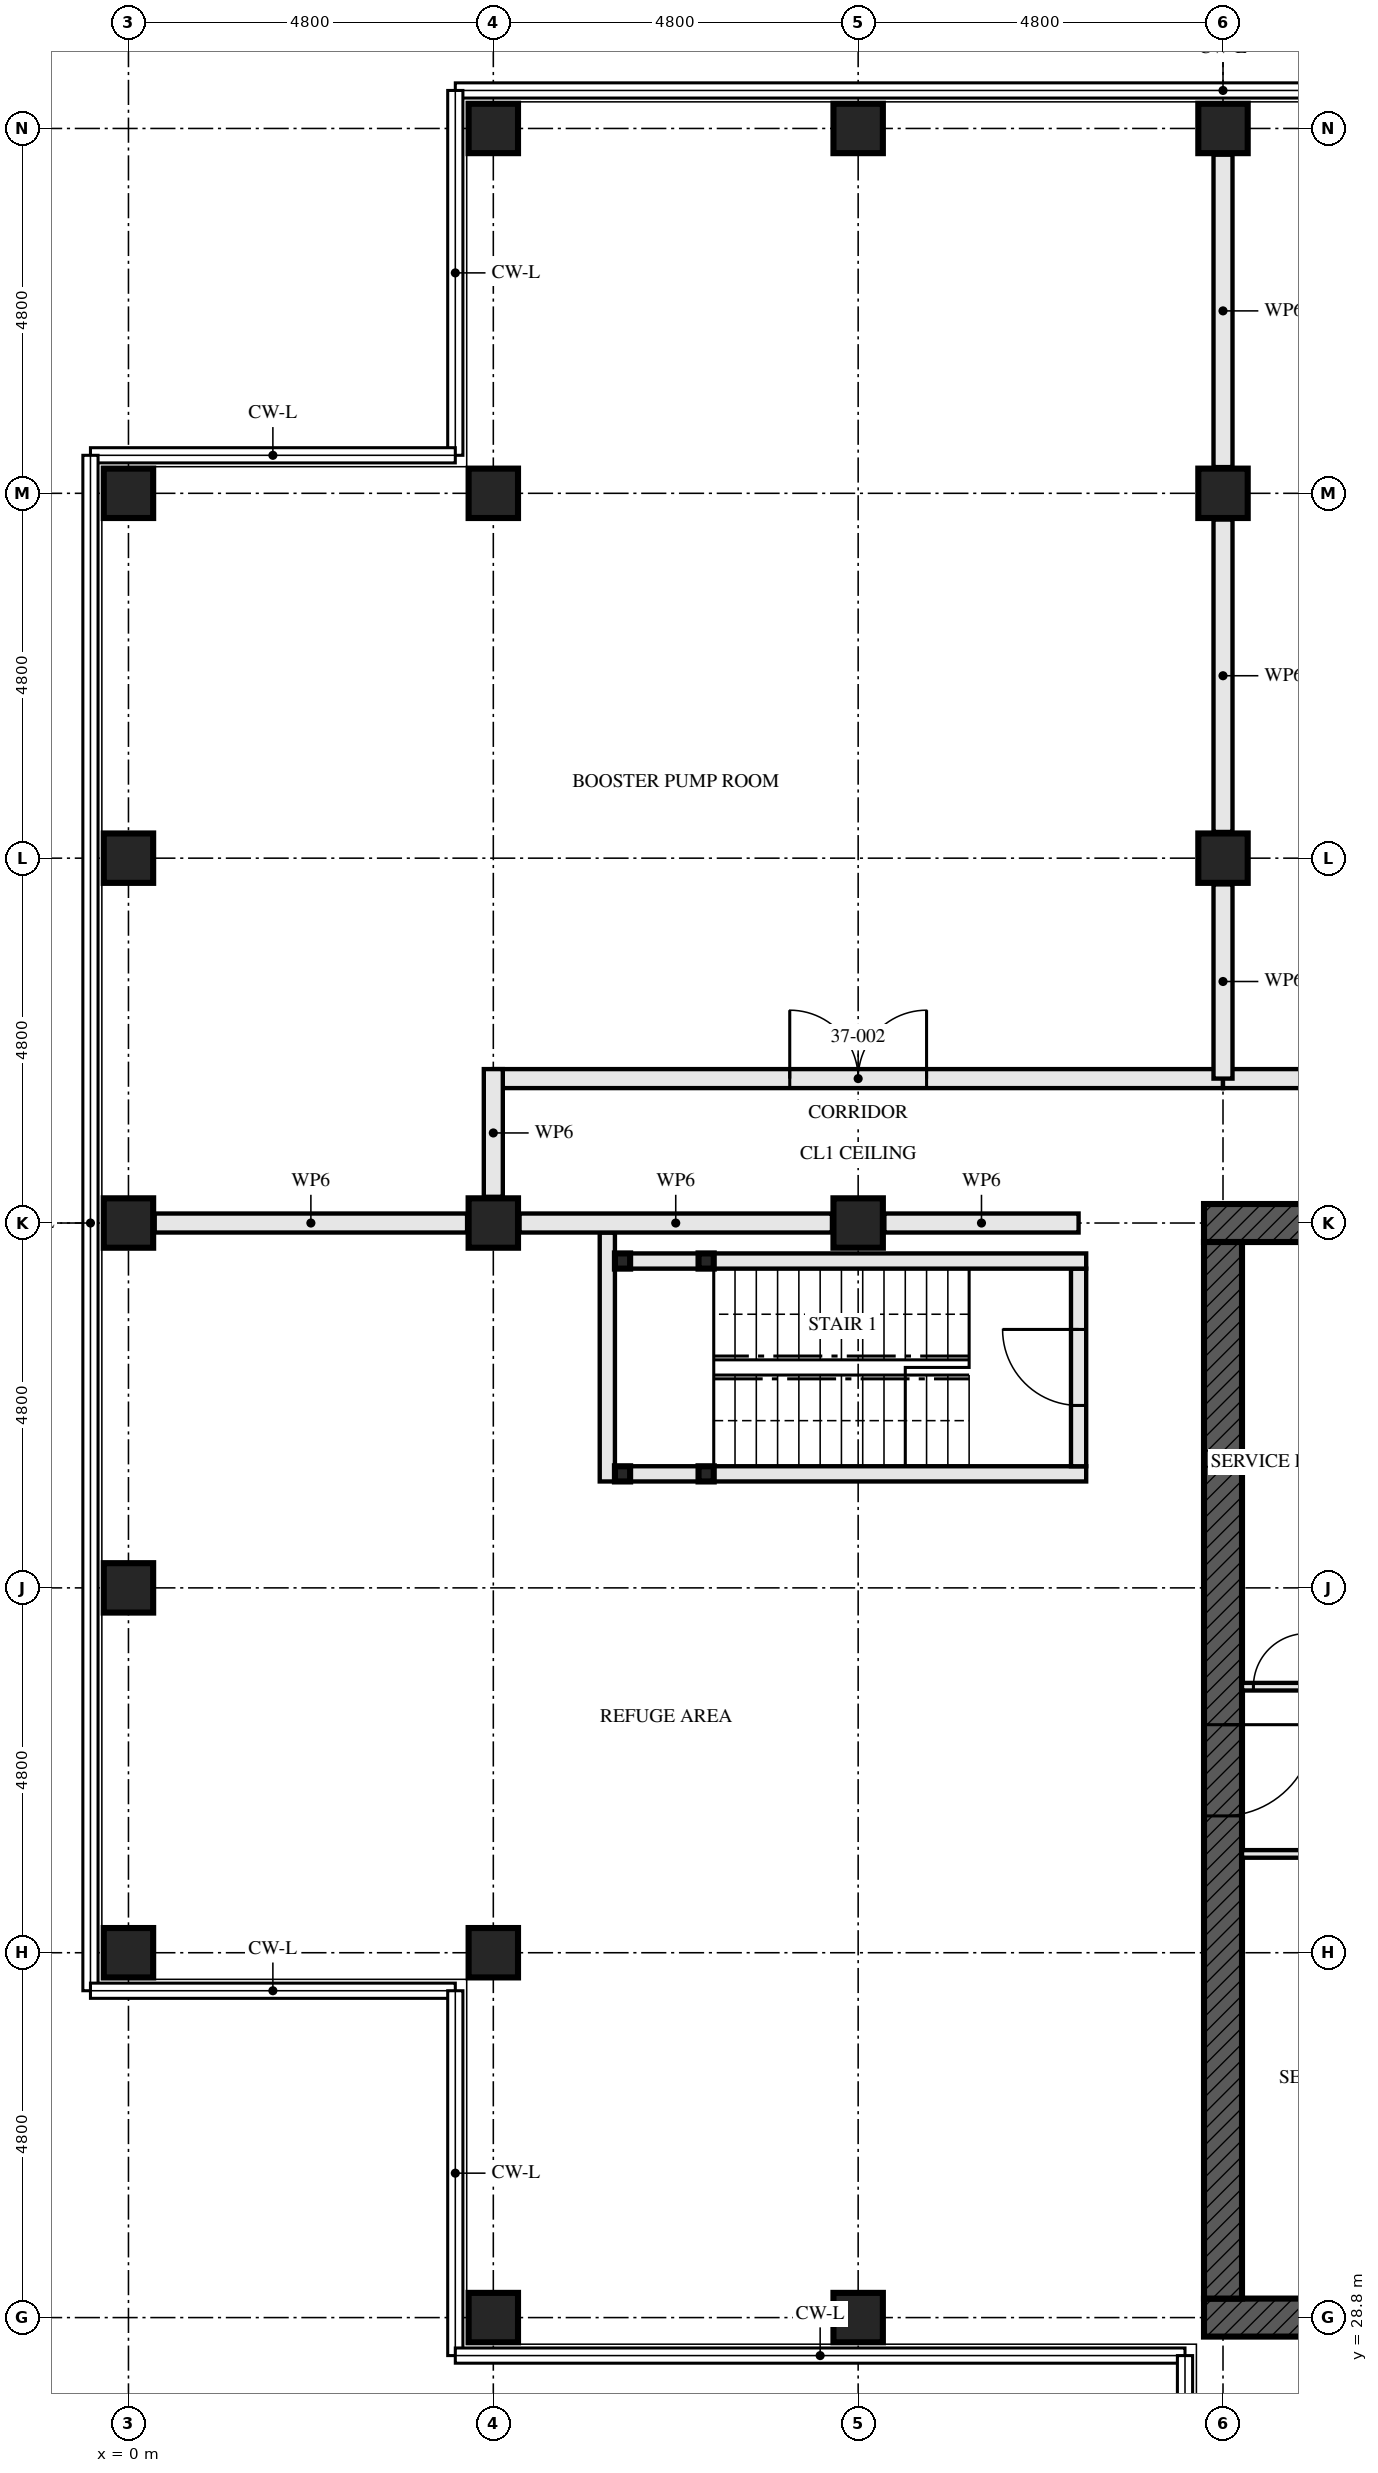
"""IFC4 building model, lengths in metres.
Left out: names, types, materials, properties, quantities, classifications, styles, units other than length and angle.
Written with IfcOpenShell. Run it as: python <this file> out.ifc"""

import sys

from ifc_helpers import new_model, si_unit, direction, frame, frame_2d, origin, origin_2d, place, context, subcontext, project, spatial, rectangle, hollow_rectangle, extrude, element, fill, save


model = new_model("IFC4")
c1 = context("Model", 3, precision=1e-05, world=origin(), true_north=direction((0.0, 1.0)))
c2 = subcontext(c1, "Body", "Model", "MODEL_VIEW")
j1 = project(units=[si_unit("LENGTHUNIT", "METRE"), si_unit("PLANEANGLEUNIT", "RADIAN")], contexts=[c1])
p1 = place(None, origin())
s1 = spatial("IfcSite", under=j1, at=p1, CompositionType="ELEMENT")
p2 = place(p1, origin())
s2 = spatial("IfcBuilding", under=s1, at=p2, CompositionType="ELEMENT")
p3 = place(p2, frame((0.0, 0.0, 136.5)))
s3 = spatial("IfcBuildingStorey", under=s2, at=p3, CompositionType="ELEMENT", Elevation=136.5)
for number, where, z_axis, x_axis in (
    (1, (0.0, 33.6, 0.0), (0.0, 0.0, 1.0), (0.0, 1.0, 0.0)),
    (2, (0.0, 38.4, 0.0), (0.0, 0.0, 1.0), (1.0, 0.0, 0.0)),
):
    element("IfcColumn", number, at=place(p3, frame(where, z_axis=z_axis, x_axis=x_axis)), inside=s3, PredefinedType="COLUMN", context=c2, shape_type="SweptSolid", body=[
        extrude(hollow_rectangle(XDim=0.65, YDim=0.65, WallThickness=0.08, at=origin_2d()), origin(), (0.0, 0.0, 1.0), 4.5),
    ])
for number, where, z_axis, x_axis in (
    (3, (0.0, 43.2, 0.0), (0.0, 0.0, 1.0), (0.0, 1.0, 0.0)),
    (4, (0.0, 48.0, 0.0), (0.0, 0.0, 1.0), (1.0, 0.0, 0.0)),
    (5, (0.0, 52.8, 0.0), (0.0, 0.0, 1.0), (0.0, 1.0, 0.0)),
):
    element("IfcColumn", number, at=place(p3, frame(where, z_axis=z_axis, x_axis=x_axis)), inside=s3, PredefinedType="COLUMN", context=c2, shape_type="SweptSolid", body=[
        extrude(hollow_rectangle(XDim=0.65, YDim=0.65, WallThickness=0.08, at=origin_2d()), origin(), (0.0, 0.0, 1.0), 4.33),
    ])
for number, where, z_axis, x_axis in (
    (6, (4.8, 28.8, 0.0), (0.0, 0.0, 1.0), (0.0, 1.0, 0.0)),
    (7, (4.8, 33.6, 0.0), (0.0, 0.0, 1.0), (0.0, 1.0, 0.0)),
):
    element("IfcColumn", number, at=place(p3, frame(where, z_axis=z_axis, x_axis=x_axis)), inside=s3, PredefinedType="COLUMN", context=c2, shape_type="SweptSolid", body=[
        extrude(hollow_rectangle(XDim=0.65, YDim=0.65, WallThickness=0.08, at=origin_2d()), origin(), (0.0, 0.0, 1.0), 4.5),
    ])
p4 = place(p3, frame((4.8, 43.2, 0.0), z_axis=(0.0, 0.0, 1.0), x_axis=(0.0, 1.0, 0.0)))
e8 = element("IfcColumn", 8, at=p4, inside=s3, PredefinedType="COLUMN", context=c2, shape_type="SweptSolid", body=[
    extrude(hollow_rectangle(XDim=0.65, YDim=0.65, WallThickness=0.05, at=origin_2d()), origin(), (0.0, 0.0, 1.0), 4.5),
])
for number, where, z_axis, x_axis in (
    (9, (4.8, 52.8, 0.0), (0.0, 0.0, 1.0), (0.0, 1.0, 0.0)),
    (10, (4.8, 57.6, 0.0), (0.0, 0.0, 1.0), (0.0, 1.0, 0.0)),
):
    element("IfcColumn", number, at=place(p3, frame(where, z_axis=z_axis, x_axis=x_axis)), inside=s3, PredefinedType="COLUMN", context=c2, shape_type="SweptSolid", body=[
        extrude(hollow_rectangle(XDim=0.65, YDim=0.65, WallThickness=0.08, at=origin_2d()), origin(), (0.0, 0.0, 1.0), 4.33),
    ])
p5 = place(p3, frame((9.6, 28.8, 0.0), z_axis=(0.0, 0.0, 1.0), x_axis=(0.0, 1.0, 0.0)))
e11 = element("IfcColumn", 11, at=p5, inside=s3, PredefinedType="COLUMN", context=c2, shape_type="SweptSolid", body=[
    extrude(hollow_rectangle(XDim=0.65, YDim=0.65, WallThickness=0.08, at=origin_2d()), origin(), (0.0, 0.0, 1.0), 4.5),
])
p6 = place(p3, frame((9.6, 43.2, 0.0), z_axis=(0.0, 0.0, 1.0), x_axis=(0.0, 1.0, 0.0)))
e12 = element("IfcColumn", 12, at=p6, inside=s3, PredefinedType="COLUMN", context=c2, shape_type="SweptSolid", body=[
    extrude(hollow_rectangle(XDim=0.65, YDim=0.65, WallThickness=0.05, at=origin_2d()), origin(), (0.0, 0.0, 1.0), 4.5),
])
p7 = place(p3, frame((9.6, 57.6, 0.0), z_axis=(0.0, 0.0, 1.0), x_axis=(0.0, 1.0, 0.0)))
e13 = element("IfcColumn", 13, at=p7, inside=s3, PredefinedType="COLUMN", context=c2, shape_type="SweptSolid", body=[
    extrude(hollow_rectangle(XDim=0.65, YDim=0.65, WallThickness=0.08, at=origin_2d()), origin(), (0.0, 0.0, 1.0), 4.33),
])
for number, where, z_axis, x_axis in (
    (14, (14.4, 48.0, 0.0), (0.0, 0.0, 1.0), (1.0, 0.0, 0.0)),
    (15, (14.4, 52.8, 0.0), (0.0, 0.0, 1.0), (1.0, 0.0, 0.0)),
):
    element("IfcColumn", number, at=place(p3, frame(where, z_axis=z_axis, x_axis=x_axis)), inside=s3, PredefinedType="COLUMN", context=c2, shape_type="SweptSolid", body=[
        extrude(hollow_rectangle(XDim=0.65, YDim=0.65, WallThickness=0.05, at=origin_2d()), origin(), (0.0, 0.0, 1.0), 4.5),
    ])
p8 = place(p3, frame((14.4, 57.6, 0.0), z_axis=(0.0, 0.0, 1.0), x_axis=(0.0, 1.0, 0.0)))
e16 = element("IfcColumn", 16, at=p8, inside=s3, PredefinedType="COLUMN", context=c2, shape_type="SweptSolid", body=[
    extrude(hollow_rectangle(XDim=0.65, YDim=0.65, WallThickness=0.08, at=origin_2d()), origin(), (0.0, 0.0, 1.0), 4.33),
])
p9 = place(p3, frame((14.15, 28.8, -0.25), z_axis=(0.0, 0.0, 1.0), x_axis=(1.0, 0.0, 0.0)))
e17 = element("IfcWall", 17, at=p9, inside=s3, PredefinedType="SHEAR", context=c2, shape_type="SweptSolid", body=[
    extrude(rectangle(XDim=14.9, YDim=0.5, at=frame_2d((7.45, 0.0))), origin(), (0.0, 0.0, 1.0), 4.58),
])
p10 = place(p9, frame((6.85, 0.0, 0.25)))
e18 = element("IfcOpeningElement", 18, at=p10, cuts=e17, PredefinedType="OPENING", context=c2, shape_type="SweptSolid", body=[
    extrude(rectangle(XDim=1.2, YDim=2.1, at=frame_2d((0.6, 1.05))), frame((0.0, 0.26, 0.0), z_axis=(0.0, -1.0, 0.0), x_axis=(1.0, 0.0, 0.0)), (0.0, 0.0, 1.0), 0.521),
])
p11 = place(p3, frame((29.05, 43.2, -0.25), z_axis=(0.0, 0.0, 1.0), x_axis=(-1.0, 0.0, 0.0)))
e19 = element("IfcWall", 19, at=p11, inside=s3, PredefinedType="SHEAR", context=c2, shape_type="SweptSolid", body=[
    extrude(rectangle(XDim=14.9, YDim=0.5, at=frame_2d((7.45, 0.0))), origin(), (0.0, 0.0, 1.0), 4.58),
])
p12 = place(p11, frame((6.85, 0.0, 0.25)))
e20 = element("IfcOpeningElement", 20, at=p12, cuts=e19, PredefinedType="OPENING", context=c2, shape_type="SweptSolid", body=[
    extrude(rectangle(XDim=1.2, YDim=2.1, at=frame_2d((0.6, 1.05))), frame((0.0, 0.26, 0.0), z_axis=(0.0, -1.0, 0.0), x_axis=(1.0, 0.0, 0.0)), (0.0, 0.0, 1.0), 0.521),
])
p13 = place(p3, frame((14.4, 42.95, -0.25), z_axis=(0.0, 0.0, 1.0), x_axis=(0.0, -1.0, 0.0)))
e21 = element("IfcWall", 21, at=p13, inside=s3, PredefinedType="SHEAR", context=c2, shape_type="SweptSolid", body=[
    extrude(rectangle(XDim=13.9, YDim=0.5, at=frame_2d((6.95, 0.0))), origin(), (0.0, 0.0, 1.0), 4.58),
])
p14 = place(p13, frame((6.35, 0.0, 0.25)))
e22 = element("IfcOpeningElement", 22, at=p14, cuts=e21, PredefinedType="OPENING", context=c2, shape_type="SweptSolid", body=[
    extrude(rectangle(XDim=1.2, YDim=2.1, at=frame_2d((0.6, 1.05))), frame((0.0, 0.26, 0.0), z_axis=(0.0, -1.0, 0.0), x_axis=(1.0, 0.0, 0.0)), (0.0, 0.0, 1.0), 0.521),
])
for number, where, z_axis, x_axis in (
    (23, (6.5, 42.7, 0.0), (0.0, 0.0, 1.0), (1.0, 0.0, 0.0)),
    (24, (6.5, 39.9, 0.0), (0.0, 0.0, 1.0), (1.0, 0.0, 0.0)),
    (25, (7.6, 42.7, 0.0), (0.0, 0.0, 1.0), (1.0, 0.0, 0.0)),
    (26, (7.6, 39.9, 0.0), (0.0, 0.0, 1.0), (1.0, 0.0, 0.0)),
):
    element("IfcColumn", number, at=place(p3, frame(where, z_axis=z_axis, x_axis=x_axis)), inside=s3, PredefinedType="COLUMN", context=c2, shape_type="SweptSolid", body=[
        extrude(hollow_rectangle(XDim=0.2, YDim=0.2, WallThickness=0.008, at=origin_2d()), origin(), (0.0, 0.0, 1.0), 4.33),
    ])
p15 = place(p3, frame((6.6, 42.7, 0.0), z_axis=(0.0, 0.0, 1.0), x_axis=(1.0, 0.0, 0.0)))
e27 = element("IfcWall", 27, at=p15, inside=s3, PredefinedType="SOLIDWALL", context=c2, shape_type="SweptSolid", body=[
    extrude(rectangle(XDim=0.9, YDim=0.2, at=frame_2d((0.45, 0.0))), origin(), (0.0, 0.0, 1.0), 3.99),
])
p16 = place(p3, frame((7.7, 42.7, 0.0), z_axis=(0.0, 0.0, 1.0), x_axis=(1.0, 0.0, 0.0)))
e28 = element("IfcWall", 28, at=p16, inside=s3, PredefinedType="SOLIDWALL", context=c2, shape_type="SweptSolid", body=[
    extrude(rectangle(XDim=4.9, YDim=0.2, at=frame_2d((2.45, 0.0))), origin(), (0.0, 0.0, 1.0), 3.99),
])
p17 = place(p3, frame((6.6, 39.9, 0.0), z_axis=(0.0, 0.0, 1.0), x_axis=(1.0, 0.0, 0.0)))
e29 = element("IfcWall", 29, at=p17, inside=s3, PredefinedType="SOLIDWALL", context=c2, shape_type="SweptSolid", body=[
    extrude(rectangle(XDim=0.9, YDim=0.2, at=frame_2d((0.45, 0.0))), origin(), (0.0, 0.0, 1.0), 3.99),
])
p18 = place(p3, frame((7.7, 39.9, 0.0), z_axis=(0.0, 0.0, 1.0), x_axis=(1.0, 0.0, 0.0)))
e30 = element("IfcWall", 30, at=p18, inside=s3, PredefinedType="SOLIDWALL", context=c2, shape_type="SweptSolid", body=[
    extrude(rectangle(XDim=4.9, YDim=0.2, at=frame_2d((2.45, 0.0))), origin(), (0.0, 0.0, 1.0), 3.99),
])
p19 = place(p3, frame((6.3, 43.075, 0.0), z_axis=(0.0, 0.0, 1.0), x_axis=(0.0, -1.0, 0.0)))
e31 = element("IfcWall", 31, at=p19, inside=s3, PredefinedType="SOLIDWALL", context=c2, shape_type="SweptSolid", body=[
    extrude(rectangle(XDim=3.275, YDim=0.2, at=frame_2d((1.637, 0.0))), origin(), (0.0, 0.0, 1.0), 4.33),
])
p20 = place(p3, frame((12.5, 42.6, 0.0), z_axis=(0.0, 0.0, 1.0), x_axis=(0.0, -1.0, 0.0)))
e32 = element("IfcWall", 32, at=p20, inside=s3, PredefinedType="SOLIDWALL", context=c2, shape_type="SweptSolid", body=[
    extrude(rectangle(XDim=2.6, YDim=0.2, at=frame_2d((1.3, 0.0))), origin(), (0.0, 0.0, 1.0), 4.33),
])
p21 = place(p20, frame((0.8, 0.0, 0.0)))
e33 = element("IfcOpeningElement", 33, at=p21, cuts=e32, PredefinedType="OPENING", context=c2, shape_type="SweptSolid", body=[
    extrude(rectangle(XDim=1.0, YDim=2.1, at=frame_2d((0.5, 1.05))), frame((0.0, 0.111, 0.0), z_axis=(0.0, -1.0, 0.0), x_axis=(1.0, 0.0, 0.0)), (0.0, 0.0, 1.0), 0.221),
])
p22 = place(p3, frame((14.4, 45.1, 0.0), z_axis=(0.0, 0.0, 1.0), x_axis=(-1.0, 0.0, 0.0)))
e34 = element("IfcWall", 34, at=p22, inside=s3, PredefinedType="SOLIDWALL", context=c2, shape_type="SweptSolid", body=[
    extrude(rectangle(XDim=9.6, YDim=0.25, at=frame_2d((4.8, 0.0))), origin(), (0.0, 0.0, 1.0), 4.33),
])
p23 = place(p22, frame((3.9, 0.0, 0.0)))
e35 = element("IfcOpeningElement", 35, at=p23, cuts=e34, PredefinedType="OPENING", context=c2, shape_type="SweptSolid", body=[
    extrude(rectangle(XDim=1.8, YDim=2.4, at=frame_2d((0.9, 1.2))), frame((0.0, 0.135, 0.0), z_axis=(0.0, -1.0, 0.0), x_axis=(1.0, 0.0, 0.0)), (0.0, 0.0, 1.0), 0.271),
])
p24 = place(p3, frame((4.8, 45.225, 0.0), z_axis=(0.0, 0.0, 1.0), x_axis=(0.0, -1.0, 0.0)))
e36 = element("IfcWall", 36, at=p24, inside=s3, PredefinedType="SOLIDWALL", context=c2, shape_type="SweptSolid", body=[
    extrude(rectangle(XDim=1.68, YDim=0.25, at=frame_2d((0.84, 0.0))), origin(), (0.0, 0.0, 1.0), 4.33),
])
p25 = place(p3, frame((29.15, 45.1, 0.0), z_axis=(0.0, 0.0, 1.0), x_axis=(-1.0, 0.0, 0.0)))
e37 = element("IfcWall", 37, at=p25, inside=s3, PredefinedType="SOLIDWALL", context=c2, shape_type="SweptSolid", body=[
    extrude(rectangle(XDim=14.75, YDim=0.25, at=frame_2d((7.375, 0.0))), origin(), (0.0, 0.0, 1.0), 3.12),
])
p26 = place(p25, frame((6.65, 0.0, 0.0)))
e38 = element("IfcOpeningElement", 38, at=p26, cuts=e37, PredefinedType="OPENING", context=c2, shape_type="SweptSolid", body=[
    extrude(rectangle(XDim=1.8, YDim=2.4, at=frame_2d((0.9, 1.2))), frame((0.0, 0.135, 0.0), z_axis=(0.0, -1.0, 0.0), x_axis=(1.0, 0.0, 0.0)), (0.0, 0.0, 1.0), 0.271),
])
p27 = place(p3, frame((14.65, 34.9, 0.0), z_axis=(0.0, 0.0, 1.0), x_axis=(1.0, 0.0, 0.0)))
e39 = element("IfcWall", 39, at=p27, inside=s3, PredefinedType="SOLIDWALL", context=c2, shape_type="SweptSolid", body=[
    extrude(rectangle(XDim=5.9, YDim=0.1, at=frame_2d((2.95, 0.0))), origin(), (0.0, 0.0, 1.0), 4.33),
])
p28 = place(p27, frame((1.6, 0.0, 0.0)))
e40 = element("IfcOpeningElement", 40, at=p28, cuts=e39, PredefinedType="OPENING", context=c2, shape_type="SweptSolid", body=[
    extrude(rectangle(XDim=0.7, YDim=2.1, at=frame_2d((0.35, 1.05))), frame((0.0, 0.061, 0.0), z_axis=(0.0, -1.0, 0.0), x_axis=(1.0, 0.0, 0.0)), (0.0, 0.0, 1.0), 0.121),
])
p29 = place(p3, frame((14.65, 37.1, 0.0), z_axis=(0.0, 0.0, 1.0), x_axis=(1.0, 0.0, 0.0)))
e41 = element("IfcWall", 41, at=p29, inside=s3, PredefinedType="SOLIDWALL", context=c2, shape_type="SweptSolid", body=[
    extrude(rectangle(XDim=5.9, YDim=0.1, at=frame_2d((2.95, 0.0))), origin(), (0.0, 0.0, 1.0), 4.33),
])
p30 = place(p29, frame((0.15, 0.0, 0.0)))
e42 = element("IfcOpeningElement", 42, at=p30, cuts=e41, PredefinedType="OPENING", context=c2, shape_type="SweptSolid", body=[
    extrude(rectangle(XDim=0.7, YDim=2.1, at=frame_2d((0.35, 1.05))), frame((0.0, 0.061, 0.0), z_axis=(0.0, -1.0, 0.0), x_axis=(1.0, 0.0, 0.0)), (0.0, 0.0, 1.0), 0.121),
])
p31 = place(p29, frame((1.5, 0.0, 0.0)))
e43 = element("IfcOpeningElement", 43, at=p31, cuts=e41, PredefinedType="OPENING", context=c2, shape_type="SweptSolid", body=[
    extrude(rectangle(XDim=0.9, YDim=2.1, at=frame_2d((0.45, 1.05))), frame((0.0, 0.061, 0.0), z_axis=(0.0, -1.0, 0.0), x_axis=(1.0, 0.0, 0.0)), (0.0, 0.0, 1.0), 0.121),
])
p32 = place(p3, frame((12.5, 43.2, 0.0), z_axis=(0.0, 0.0, 1.0), x_axis=(-1.0, 0.0, 0.0)))
e44 = element("IfcWall", 44, at=p32, inside=s3, PredefinedType="SOLIDWALL", context=c2, shape_type="SweptSolid", body=[
    extrude(rectangle(XDim=2.555, YDim=0.25, at=frame_2d((1.277, 0.0))), origin(), (0.0, 0.0, 1.0), 3.12),
])
p33 = place(p3, frame((9.255, 43.2, 0.0), z_axis=(0.0, 0.0, 1.0), x_axis=(-1.0, 0.0, 0.0)))
e45 = element("IfcWall", 45, at=p33, inside=s3, PredefinedType="SOLIDWALL", context=c2, shape_type="SweptSolid", body=[
    extrude(rectangle(XDim=4.11, YDim=0.25, at=frame_2d((2.055, 0.0))), origin(), (0.0, 0.0, 1.0), 3.12),
])
p34 = place(p3, frame((4.455, 43.2, 0.0), z_axis=(0.0, 0.0, 1.0), x_axis=(-1.0, 0.0, 0.0)))
e46 = element("IfcWall", 46, at=p34, inside=s3, PredefinedType="SOLIDWALL", context=c2, shape_type="SweptSolid", body=[
    extrude(rectangle(XDim=4.11, YDim=0.25, at=frame_2d((2.055, 0.0))), origin(), (0.0, 0.0, 1.0), 3.12),
])
p35 = place(p3, frame((14.4, 45.1, 0.0), z_axis=(0.0, 0.0, 1.0), x_axis=(0.0, 1.0, 0.0)))
e47 = element("IfcWall", 47, at=p35, inside=s3, PredefinedType="SOLIDWALL", context=c2, shape_type="SweptSolid", body=[
    extrude(rectangle(XDim=2.555, YDim=0.25, at=frame_2d((1.277, 0.0))), origin(), (0.0, 0.0, 1.0), 2.82),
])
p36 = place(p3, frame((14.4, 48.345, 0.0), z_axis=(0.0, 0.0, 1.0), x_axis=(0.0, 1.0, 0.0)))
e48 = element("IfcWall", 48, at=p36, inside=s3, PredefinedType="SOLIDWALL", context=c2, shape_type="SweptSolid", body=[
    extrude(rectangle(XDim=4.11, YDim=0.25, at=frame_2d((2.055, 0.0))), origin(), (0.0, 0.0, 1.0), 2.82),
])
p37 = place(p3, frame((14.4, 53.145, 0.0), z_axis=(0.0, 0.0, 1.0), x_axis=(0.0, 1.0, 0.0)))
e49 = element("IfcWall", 49, at=p37, inside=s3, PredefinedType="SOLIDWALL", context=c2, shape_type="SweptSolid", body=[
    extrude(rectangle(XDim=4.11, YDim=0.25, at=frame_2d((2.055, 0.0))), origin(), (0.0, 0.0, 1.0), 2.82),
])
p38 = place(p21, frame((1.0, 0.0, 0.0), z_axis=(0.0, 0.0, 1.0), x_axis=(-1.0, 0.0, 0.0)))
e50 = element("IfcDoor", 50, at=p38, inside=s3, OperationType="SINGLE_SWING_LEFT", PredefinedType="DOOR", context=c2, shape_type="SweptSolid", body=[
    extrude(rectangle(XDim=1.0, YDim=2.1, at=frame_2d((0.5, 1.05))), frame((0.0, 0.032, 0.0), z_axis=(0.0, -1.0, 0.0), x_axis=(1.0, 0.0, 0.0)), (0.0, 0.0, 1.0), 0.064),
])
fill(e33, e50)
p39 = place(p23, frame((1.8, 0.0, 0.0), z_axis=(0.0, 0.0, 1.0), x_axis=(-1.0, 0.0, 0.0)))
e51 = element("IfcDoor", 51, at=p39, inside=s3, OperationType="DOUBLE_DOOR_SINGLE_SWING", PredefinedType="DOOR", context=c2, shape_type="SweptSolid", body=[
    extrude(rectangle(XDim=1.8, YDim=2.4, at=frame_2d((0.9, 1.2))), frame((0.0, 0.032, 0.0), z_axis=(0.0, -1.0, 0.0), x_axis=(1.0, 0.0, 0.0)), (0.0, 0.0, 1.0), 0.064),
])
fill(e35, e51)
p40 = place(p30, origin())
e52 = element("IfcDoor", 52, at=p40, inside=s3, OperationType="SINGLE_SWING_LEFT", PredefinedType="DOOR", context=c2, shape_type="SweptSolid", body=[
    extrude(rectangle(XDim=0.7, YDim=2.1, at=frame_2d((0.35, 1.05))), frame((0.0, 0.027, 0.0), z_axis=(0.0, -1.0, 0.0), x_axis=(1.0, 0.0, 0.0)), (0.0, 0.0, 1.0), 0.054),
])
fill(e42, e52)
p41 = place(p14, origin())
e53 = element("IfcDoor", 53, at=p41, inside=s3, OperationType="SINGLE_SWING_LEFT", PredefinedType="DOOR", context=c2, shape_type="SweptSolid", body=[
    extrude(rectangle(XDim=1.2, YDim=2.1, at=frame_2d((0.6, 1.05))), frame((0.0, 0.027, 0.0), z_axis=(0.0, -1.0, 0.0), x_axis=(1.0, 0.0, 0.0)), (0.0, 0.0, 1.0), 0.054),
])
fill(e22, e53)
save(model, sys.argv[1])
